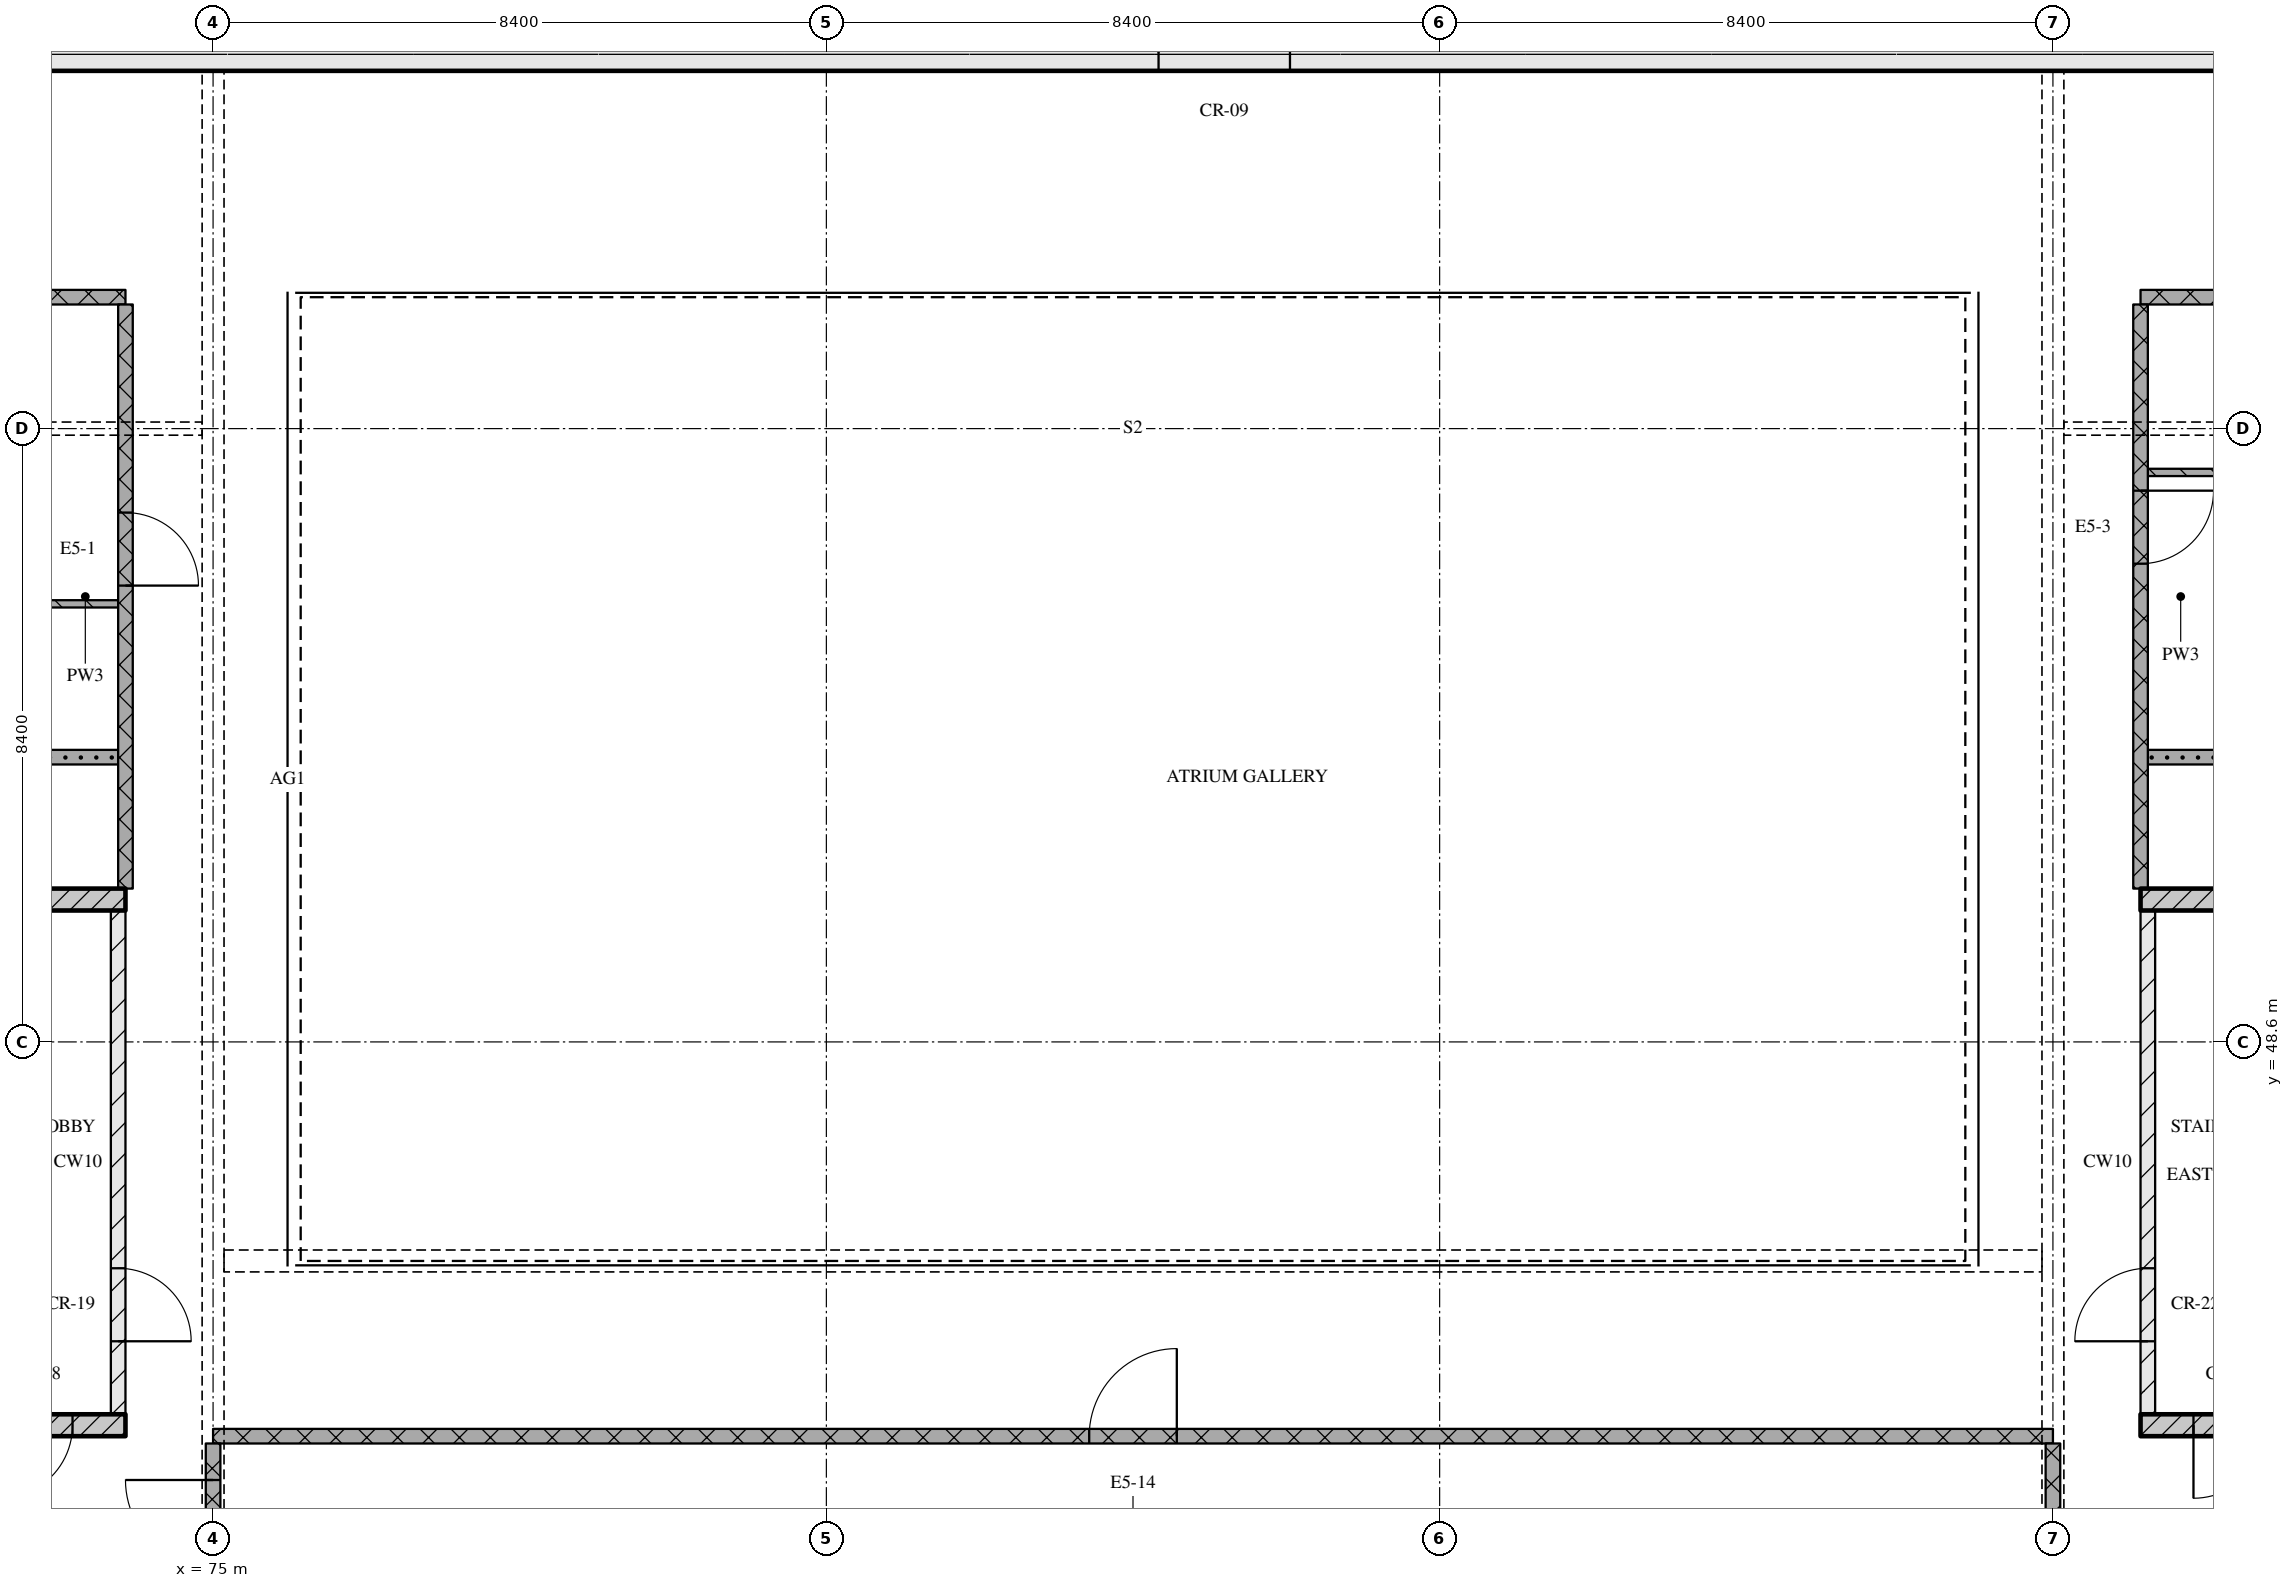
"""IFC4 building model, lengths in metres.
Left out: names, types, materials, properties, quantities, classifications, styles, units other than length and angle.
Written with IfcOpenShell. Run it as: python <this file> out.ifc"""

import sys

from ifc_helpers import new_model, si_unit, direction, frame, frame_2d, origin, place, context, subcontext, project, spatial, rectangle, extrude, element, fill, save


model = new_model("IFC4")
c1 = context("Model", 3, precision=1e-05, world=origin(), true_north=direction((0.0, 1.0)))
c2 = subcontext(c1, "Body", "Model", "MODEL_VIEW")
j1 = project(units=[si_unit("LENGTHUNIT", "METRE"), si_unit("PLANEANGLEUNIT", "RADIAN")], contexts=[c1])
p1 = place(None, origin())
s1 = spatial("IfcSite", under=j1, at=p1, CompositionType="ELEMENT")
p2 = place(p1, origin())
s2 = spatial("IfcBuilding", under=s1, at=p2, CompositionType="ELEMENT")
p3 = place(p2, frame((0.0, 0.0, 292.35)))
s3 = spatial("IfcBuildingStorey", under=s2, at=p3, CompositionType="ELEMENT", Elevation=292.35)
p4 = place(p3, frame((67.3, 62.15, 0.0), z_axis=(0.0, 0.0, 1.0), x_axis=(1.0, 0.0, 0.0)))
e1 = element("IfcWall", 1, at=p4, inside=s3, PredefinedType="SOLIDWALL", context=c2, shape_type="SweptSolid", body=[
    extrude(rectangle(XDim=40.6, YDim=0.5, at=frame_2d((20.3, 0.0))), origin(), (0.0, 0.0, 1.0), 3.32),
])
p5 = place(p4, frame((20.65, 0.0, 0.0)))
e2 = element("IfcOpeningElement", 2, at=p5, cuts=e1, PredefinedType="OPENING", context=c2, shape_type="SweptSolid", body=[
    extrude(rectangle(XDim=1.8, YDim=2.1, at=frame_2d((0.9, 1.05))), frame((0.0, 0.26, 0.0), z_axis=(0.0, -1.0, 0.0), x_axis=(1.0, 0.0, 0.0)), (0.0, 0.0, 1.0), 0.52),
])
p6 = place(p3, frame((68.2, 43.35, 0.0), z_axis=(0.0, 0.0, 1.0), x_axis=(1.0, 0.0, 0.0)))
e3 = element("IfcWall", 3, at=p6, inside=s3, PredefinedType="SOLIDWALL", context=c2, shape_type="SweptSolid", body=[
    extrude(rectangle(XDim=5.6, YDim=0.3, at=frame_2d((2.8, 0.0))), origin(), (0.0, 0.0, 1.0), 3.32),
])
p7 = place(p6, frame((3.875, 0.0, 0.0)))
e4 = element("IfcOpeningElement", 4, at=p7, cuts=e3, PredefinedType="OPENING", context=c2, shape_type="SweptSolid", body=[
    extrude(rectangle(XDim=1.0, YDim=2.1, at=frame_2d((0.5, 1.05))), frame((0.0, 0.16, 0.0), z_axis=(0.0, -1.0, 0.0), x_axis=(1.0, 0.0, 0.0)), (0.0, 0.0, 1.0), 0.32),
])
p8 = place(p3, frame((73.7, 43.5, 0.0), z_axis=(0.0, 0.0, 1.0), x_axis=(0.0, 1.0, 0.0)))
e5 = element("IfcWall", 5, at=p8, inside=s3, PredefinedType="PARTITIONING", context=c2, shape_type="SweptSolid", body=[
    extrude(rectangle(XDim=6.9, YDim=0.2, at=frame_2d((3.45, 0.0))), origin(), (0.0, 0.0, 1.0), 3.32),
])
p9 = place(p8, frame((1.0, 0.0, 0.0)))
e6 = element("IfcOpeningElement", 6, at=p9, cuts=e5, PredefinedType="OPENING", context=c2, shape_type="SweptSolid", body=[
    extrude(rectangle(XDim=1.0, YDim=2.1, at=frame_2d((0.5, 1.05))), frame((0.0, 0.11, 0.0), z_axis=(0.0, -1.0, 0.0), x_axis=(1.0, 0.0, 0.0)), (0.0, 0.0, 1.0), 0.22),
])
p10 = place(p3, frame((68.2, 50.55, 0.0), z_axis=(0.0, 0.0, 1.0), x_axis=(1.0, 0.0, 0.0)))
e7 = element("IfcWall", 7, at=p10, inside=s3, PredefinedType="SOLIDWALL", context=c2, shape_type="SweptSolid", body=[
    extrude(rectangle(XDim=5.6, YDim=0.3, at=frame_2d((2.8, 0.0))), origin(), (0.0, 0.0, 1.0), 3.32),
])
p11 = place(p3, frame((101.4, 43.35, 0.0), z_axis=(0.0, 0.0, 1.0), x_axis=(1.0, 0.0, 0.0)))
e8 = element("IfcWall", 8, at=p11, inside=s3, PredefinedType="SOLIDWALL", context=c2, shape_type="SweptSolid", body=[
    extrude(rectangle(XDim=5.6, YDim=0.3, at=frame_2d((2.8, 0.0))), origin(), (0.0, 0.0, 1.0), 3.32),
])
p12 = place(p11, frame((0.725, 0.0, 0.0)))
e9 = element("IfcOpeningElement", 9, at=p12, cuts=e8, PredefinedType="OPENING", context=c2, shape_type="SweptSolid", body=[
    extrude(rectangle(XDim=1.0, YDim=2.1, at=frame_2d((0.5, 1.05))), frame((0.0, 0.16, 0.0), z_axis=(0.0, -1.0, 0.0), x_axis=(1.0, 0.0, 0.0)), (0.0, 0.0, 1.0), 0.32),
])
p13 = place(p3, frame((101.5, 43.5, 0.0), z_axis=(0.0, 0.0, 1.0), x_axis=(0.0, 1.0, 0.0)))
e10 = element("IfcWall", 10, at=p13, inside=s3, PredefinedType="PARTITIONING", context=c2, shape_type="SweptSolid", body=[
    extrude(rectangle(XDim=6.9, YDim=0.2, at=frame_2d((3.45, 0.0))), origin(), (0.0, 0.0, 1.0), 3.32),
])
p14 = place(p13, frame((1.0, 0.0, 0.0)))
e11 = element("IfcOpeningElement", 11, at=p14, cuts=e10, PredefinedType="OPENING", context=c2, shape_type="SweptSolid", body=[
    extrude(rectangle(XDim=1.0, YDim=2.1, at=frame_2d((0.5, 1.05))), frame((0.0, 0.11, 0.0), z_axis=(0.0, -1.0, 0.0), x_axis=(1.0, 0.0, 0.0)), (0.0, 0.0, 1.0), 0.22),
])
p15 = place(p3, frame((101.4, 50.55, 0.0), z_axis=(0.0, 0.0, 1.0), x_axis=(1.0, 0.0, 0.0)))
e12 = element("IfcWall", 12, at=p15, inside=s3, PredefinedType="SOLIDWALL", context=c2, shape_type="SweptSolid", body=[
    extrude(rectangle(XDim=5.6, YDim=0.3, at=frame_2d((2.8, 0.0))), origin(), (0.0, 0.0, 1.0), 3.32),
])
p16 = place(p3, frame((100.2, 43.2, 0.0), z_axis=(0.0, 0.0, 1.0), x_axis=(-1.0, 0.0, 0.0)))
e13 = element("IfcWall", 13, at=p16, inside=s3, PredefinedType="PARTITIONING", context=c2, shape_type="SweptSolid", body=[
    extrude(rectangle(XDim=25.2, YDim=0.2, at=frame_2d((12.6, 0.0))), origin(), (0.0, 0.0, 1.0), 3.32),
])
p17 = place(p16, frame((12.0, 0.0, 0.0)))
e14 = element("IfcOpeningElement", 14, at=p17, cuts=e13, PredefinedType="OPENING", context=c2, shape_type="SweptSolid", body=[
    extrude(rectangle(XDim=1.2, YDim=2.1, at=frame_2d((0.6, 1.05))), frame((0.0, 0.11, 0.0), z_axis=(0.0, -1.0, 0.0), x_axis=(1.0, 0.0, 0.0)), (0.0, 0.0, 1.0), 0.22),
])
for number, where, z_axis, x_axis in (
    (15, (56.68, 52.5, 0.0), (0.0, 0.0, 1.0), (1.0, 0.0, 0.0)),
    (16, (101.5, 52.5, 0.0), (0.0, 0.0, 1.0), (1.0, 0.0, 0.0)),
):
    element("IfcWall", number, at=place(p3, frame(where, z_axis=z_axis, x_axis=x_axis)), inside=s3, PredefinedType="PARTITIONING", context=c2, shape_type="SweptSolid", body=[
        extrude(rectangle(XDim=17.02, YDim=0.2, at=frame_2d((8.51, 0.0))), origin(), (0.0, 0.0, 1.0), 3.32),
    ])
p18 = place(p3, frame((73.7, 54.6, 0.0), z_axis=(0.0, 0.0, 1.0), x_axis=(-1.0, 0.0, 0.0)))
e17 = element("IfcWall", 17, at=p18, inside=s3, PredefinedType="PARTITIONING", context=c2, shape_type="SweptSolid", body=[
    extrude(rectangle(XDim=8.9, YDim=0.1, at=frame_2d((4.45, 0.0))), origin(), (0.0, 0.0, 1.0), 3.32),
])
p19 = place(p18, frame((4.0, 0.0, 0.0)))
e18 = element("IfcOpeningElement", 18, at=p19, cuts=e17, PredefinedType="OPENING", context=c2, shape_type="SweptSolid", body=[
    extrude(rectangle(XDim=0.8, YDim=2.1, at=frame_2d((0.4, 1.05))), frame((0.0, 0.06, 0.0), z_axis=(0.0, -1.0, 0.0), x_axis=(1.0, 0.0, 0.0)), (0.0, 0.0, 1.0), 0.12),
])
p20 = place(p3, frame((101.5, 56.4, 0.0), z_axis=(0.0, 0.0, 1.0), x_axis=(1.0, 0.0, 0.0)))
e19 = element("IfcWall", 19, at=p20, inside=s3, PredefinedType="PARTITIONING", context=c2, shape_type="SweptSolid", body=[
    extrude(rectangle(XDim=8.0, YDim=0.1, at=frame_2d((4.0, 0.0))), origin(), (0.0, 0.0, 1.0), 3.32),
])
p21 = place(p20, frame((3.55, 0.0, 0.0)))
e20 = element("IfcOpeningElement", 20, at=p21, cuts=e19, PredefinedType="OPENING", context=c2, shape_type="SweptSolid", body=[
    extrude(rectangle(XDim=0.8, YDim=2.1, at=frame_2d((0.4, 1.05))), frame((0.0, 0.06, 0.0), z_axis=(0.0, -1.0, 0.0), x_axis=(1.0, 0.0, 0.0)), (0.0, 0.0, 1.0), 0.12),
])
for number, where, z_axis, x_axis in (
    (21, (64.2, 58.8, 0.0), (0.0, 0.0, 1.0), (1.0, 0.0, 0.0)),
    (22, (101.4, 58.8, 0.0), (0.0, 0.0, 1.0), (1.0, 0.0, 0.0)),
):
    element("IfcWall", number, at=place(p3, frame(where, z_axis=z_axis, x_axis=x_axis)), inside=s3, PredefinedType="PARTITIONING", context=c2, shape_type="SweptSolid", body=[
        extrude(rectangle(XDim=9.6, YDim=0.2, at=frame_2d((4.8, 0.0))), origin(), (0.0, 0.0, 1.0), 3.32),
    ])
p22 = place(p3, frame((73.8, 50.7, 0.0), z_axis=(0.0, 0.0, 1.0), x_axis=(0.0, 1.0, 0.0)))
e23 = element("IfcWall", 23, at=p22, inside=s3, PredefinedType="PARTITIONING", context=c2, shape_type="SweptSolid", body=[
    extrude(rectangle(XDim=8.0, YDim=0.2, at=frame_2d((4.0, 0.0))), origin(), (0.0, 0.0, 1.0), 3.32),
])
p23 = place(p22, frame((4.15, 0.0, 0.0)))
e24 = element("IfcOpeningElement", 24, at=p23, cuts=e23, PredefinedType="OPENING", context=c2, shape_type="SweptSolid", body=[
    extrude(rectangle(XDim=1.0, YDim=2.1, at=frame_2d((0.5, 1.05))), frame((0.0, 0.11, 0.0), z_axis=(0.0, -1.0, 0.0), x_axis=(1.0, 0.0, 0.0)), (0.0, 0.0, 1.0), 0.22),
])
p24 = place(p3, frame((75.0, 43.1, 0.0), z_axis=(0.0, 0.0, 1.0), x_axis=(0.0, -1.0, 0.0)))
e25 = element("IfcWall", 25, at=p24, inside=s3, PredefinedType="PARTITIONING", context=c2, shape_type="SweptSolid", body=[
    extrude(rectangle(XDim=2.2, YDim=0.2, at=frame_2d((1.1, 0.0))), origin(), (0.0, 0.0, 1.0), 2.53),
])
p25 = place(p24, frame((0.5, 0.0, 0.0)))
e26 = element("IfcOpeningElement", 26, at=p25, cuts=e25, PredefinedType="OPENING", context=c2, shape_type="SweptSolid", body=[
    extrude(rectangle(XDim=1.2, YDim=2.1, at=frame_2d((0.6, 1.05))), frame((0.0, 0.11, 0.0), z_axis=(0.0, -1.0, 0.0), x_axis=(1.0, 0.0, 0.0)), (0.0, 0.0, 1.0), 0.22),
])
p26 = place(p3, frame((100.2, 43.1, 0.0), z_axis=(0.0, 0.0, 1.0), x_axis=(0.0, -1.0, 0.0)))
e27 = element("IfcWall", 27, at=p26, inside=s3, PredefinedType="PARTITIONING", context=c2, shape_type="SweptSolid", body=[
    extrude(rectangle(XDim=2.2, YDim=0.2, at=frame_2d((1.1, 0.0))), origin(), (0.0, 0.0, 1.0), 2.53),
])
p27 = place(p3, frame((101.4, 58.7, 0.0), z_axis=(0.0, 0.0, 1.0), x_axis=(0.0, -1.0, 0.0)))
e28 = element("IfcWall", 28, at=p27, inside=s3, PredefinedType="PARTITIONING", context=c2, shape_type="SweptSolid", body=[
    extrude(rectangle(XDim=8.0, YDim=0.2, at=frame_2d((4.0, 0.0))), origin(), (0.0, 0.0, 1.0), 3.32),
])
p28 = place(p27, frame((2.55, 0.0, 0.0)))
e29 = element("IfcOpeningElement", 29, at=p28, cuts=e28, PredefinedType="OPENING", context=c2, shape_type="SweptSolid", body=[
    extrude(rectangle(XDim=1.0, YDim=2.1, at=frame_2d((0.5, 1.05))), frame((0.0, 0.11, 0.0), z_axis=(0.0, -1.0, 0.0), x_axis=(1.0, 0.0, 0.0)), (0.0, 0.0, 1.0), 0.22),
])
p29 = place(p5, origin())
e30 = element("IfcDoor", 30, at=p29, inside=s3, OperationType="DOUBLE_DOOR_SINGLE_SWING", PredefinedType="DOOR", context=c2, shape_type="SweptSolid", body=[
    extrude(rectangle(XDim=1.8, YDim=2.1, at=frame_2d((0.9, 1.05))), frame((0.0, 0.025, 0.0), z_axis=(0.0, -1.0, 0.0), x_axis=(1.0, 0.0, 0.0)), (0.0, 0.0, 1.0), 0.05),
])
fill(e2, e30)
p30 = place(p7, origin())
e31 = element("IfcDoor", 31, at=p30, inside=s3, OperationType="SINGLE_SWING_RIGHT", PredefinedType="DOOR", context=c2, shape_type="SweptSolid", body=[
    extrude(rectangle(XDim=1.0, YDim=2.1, at=frame_2d((0.5, 1.05))), frame((0.0, 0.025, 0.0), z_axis=(0.0, -1.0, 0.0), x_axis=(1.0, 0.0, 0.0)), (0.0, 0.0, 1.0), 0.05),
])
fill(e4, e31)
p31 = place(p9, origin())
e32 = element("IfcDoor", 32, at=p31, inside=s3, OperationType="SINGLE_SWING_RIGHT", PredefinedType="DOOR", context=c2, shape_type="SweptSolid", body=[
    extrude(rectangle(XDim=1.0, YDim=2.1, at=frame_2d((0.5, 1.05))), frame((0.0, 0.025, 0.0), z_axis=(0.0, -1.0, 0.0), x_axis=(1.0, 0.0, 0.0)), (0.0, 0.0, 1.0), 0.05),
])
fill(e6, e32)
p32 = place(p12, origin())
e33 = element("IfcDoor", 33, at=p32, inside=s3, OperationType="SINGLE_SWING_RIGHT", PredefinedType="DOOR", context=c2, shape_type="SweptSolid", body=[
    extrude(rectangle(XDim=1.0, YDim=2.1, at=frame_2d((0.5, 1.05))), frame((0.0, 0.025, 0.0), z_axis=(0.0, -1.0, 0.0), x_axis=(1.0, 0.0, 0.0)), (0.0, 0.0, 1.0), 0.05),
])
fill(e9, e33)
p33 = place(p14, origin())
e34 = element("IfcDoor", 34, at=p33, inside=s3, OperationType="SINGLE_SWING_LEFT", PredefinedType="DOOR", context=c2, shape_type="SweptSolid", body=[
    extrude(rectangle(XDim=1.0, YDim=2.1, at=frame_2d((0.5, 1.05))), frame((0.0, 0.025, 0.0), z_axis=(0.0, -1.0, 0.0), x_axis=(1.0, 0.0, 0.0)), (0.0, 0.0, 1.0), 0.05),
])
fill(e11, e34)
p34 = place(p17, origin())
e35 = element("IfcDoor", 35, at=p34, inside=s3, OperationType="SINGLE_SWING_RIGHT", PredefinedType="DOOR", context=c2, shape_type="SweptSolid", body=[
    extrude(rectangle(XDim=1.2, YDim=2.1, at=frame_2d((0.6, 1.05))), frame((0.0, 0.025, 0.0), z_axis=(0.0, -1.0, 0.0), x_axis=(1.0, 0.0, 0.0)), (0.0, 0.0, 1.0), 0.05),
])
fill(e14, e35)
p35 = place(p23, origin())
e36 = element("IfcDoor", 36, at=p35, inside=s3, OperationType="SINGLE_SWING_RIGHT", PredefinedType="DOOR", context=c2, shape_type="SweptSolid", body=[
    extrude(rectangle(XDim=1.0, YDim=2.1, at=frame_2d((0.5, 1.05))), frame((0.0, 0.025, 0.0), z_axis=(0.0, -1.0, 0.0), x_axis=(1.0, 0.0, 0.0)), (0.0, 0.0, 1.0), 0.05),
])
fill(e24, e36)
p36 = place(p25, origin())
e37 = element("IfcDoor", 37, at=p36, inside=s3, OperationType="SINGLE_SWING_RIGHT", PredefinedType="DOOR", context=c2, shape_type="SweptSolid", body=[
    extrude(rectangle(XDim=1.2, YDim=2.1, at=frame_2d((0.6, 1.05))), frame((0.0, 0.025, 0.0), z_axis=(0.0, -1.0, 0.0), x_axis=(1.0, 0.0, 0.0)), (0.0, 0.0, 1.0), 0.05),
])
fill(e26, e37)
p37 = place(p28, origin())
e38 = element("IfcDoor", 38, at=p37, inside=s3, OperationType="SINGLE_SWING_LEFT", PredefinedType="DOOR", context=c2, shape_type="SweptSolid", body=[
    extrude(rectangle(XDim=1.0, YDim=2.1, at=frame_2d((0.5, 1.05))), frame((0.0, 0.025, 0.0), z_axis=(0.0, -1.0, 0.0), x_axis=(1.0, 0.0, 0.0)), (0.0, 0.0, 1.0), 0.05),
])
fill(e29, e38)
save(model, sys.argv[1])
